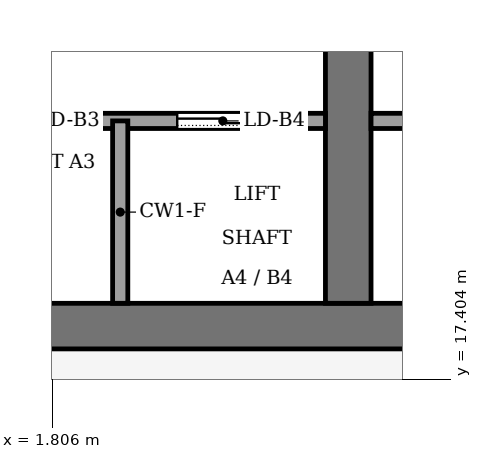
"""IFC4 building model, lengths in metres.
Left out: names, types, materials, properties, quantities, classifications, styles, units other than length and angle.
Written with IfcOpenShell. Run it as: python <this file> out.ifc"""

import sys

from ifc_helpers import new_model, si_unit, direction, frame, frame_2d, origin, place, context, subcontext, project, spatial, rectangle, extrude, element, fill, save


model = new_model("IFC4")
c1 = context("Model", 3, precision=1e-05, world=origin(), true_north=direction((0.0, 1.0)))
c2 = subcontext(c1, "Body", "Model", "MODEL_VIEW")
j1 = project(units=[si_unit("LENGTHUNIT", "METRE"), si_unit("PLANEANGLEUNIT", "RADIAN")], contexts=[c1])
p1 = place(None, origin())
s1 = spatial("IfcSite", under=j1, at=p1, CompositionType="ELEMENT")
p2 = place(p1, origin())
s2 = spatial("IfcBuilding", under=s1, at=p2, CompositionType="ELEMENT")
p3 = place(p2, frame((0.0, 0.0, 294.0)))
s3 = spatial("IfcBuildingStorey", under=s2, at=p3, CompositionType="ELEMENT", Elevation=294.0)
p4 = place(p3, frame((-13.2, 18.1, -0.13), z_axis=(0.0, 0.0, 1.0), x_axis=(1.0, 0.0, 0.0)))
e1 = element("IfcWall", 1, at=p4, inside=s3, PredefinedType="SHEAR", context=c2, shape_type="SweptSolid", body=[
    extrude(rectangle(XDim=26.4, YDim=0.6, at=frame_2d((13.2, 0.0))), origin(), (0.0, 0.0, 1.0), 4.0),
])
p5 = place(p3, frame((5.7, 18.4, -0.13), z_axis=(0.0, 0.0, 1.0), x_axis=(0.0, 1.0, 0.0)))
e2 = element("IfcWall", 2, at=p5, inside=s3, PredefinedType="SHEAR", context=c2, shape_type="SweptSolid", body=[
    extrude(rectangle(XDim=19.2, YDim=0.6, at=frame_2d((9.6, 0.0))), origin(), (0.0, 0.0, 1.0), 4.0),
])
p6 = place(p5, frame((13.3, 0.0, 0.13)))
e3 = element("IfcOpeningElement", 3, at=p6, cuts=e2, PredefinedType="OPENING", context=c2, shape_type="SweptSolid", body=[
    extrude(rectangle(XDim=2.4, YDim=2.4, at=frame_2d((1.2, 1.2))), frame((0.0, 0.31, 0.0), z_axis=(0.0, -1.0, 0.0), x_axis=(1.0, 0.0, 0.0)), (0.0, 0.0, 1.0), 0.62),
])
p7 = place(p3, frame((-5.4, 20.8, 0.0), z_axis=(0.0, 0.0, 1.0), x_axis=(1.0, 0.0, 0.0)))
e4 = element("IfcWall", 4, at=p7, inside=s3, PredefinedType="PARTITIONING", context=c2, shape_type="SweptSolid", body=[
    extrude(rectangle(XDim=10.8, YDim=0.2, at=frame_2d((5.4, 0.0))), origin(), (0.0, 0.0, 1.0), 3.87),
])
p8 = place(p7, frame((0.75, 0.0, 0.0)))
e5 = element("IfcOpeningElement", 5, at=p8, cuts=e4, PredefinedType="OPENING", context=c2, shape_type="SweptSolid", body=[
    extrude(rectangle(XDim=1.2, YDim=2.2, at=frame_2d((0.6, 1.1))), frame((0.0, 0.11, 0.0), z_axis=(0.0, -1.0, 0.0), x_axis=(1.0, 0.0, 0.0)), (0.0, 0.0, 1.0), 0.22),
])
p9 = place(p7, frame((3.45, 0.0, 0.0)))
e6 = element("IfcOpeningElement", 6, at=p9, cuts=e4, PredefinedType="OPENING", context=c2, shape_type="SweptSolid", body=[
    extrude(rectangle(XDim=1.2, YDim=2.2, at=frame_2d((0.6, 1.1))), frame((0.0, 0.11, 0.0), z_axis=(0.0, -1.0, 0.0), x_axis=(1.0, 0.0, 0.0)), (0.0, 0.0, 1.0), 0.22),
])
p10 = place(p7, frame((6.15, 0.0, 0.0)))
e7 = element("IfcOpeningElement", 7, at=p10, cuts=e4, PredefinedType="OPENING", context=c2, shape_type="SweptSolid", body=[
    extrude(rectangle(XDim=1.2, YDim=2.2, at=frame_2d((0.6, 1.1))), frame((0.0, 0.11, 0.0), z_axis=(0.0, -1.0, 0.0), x_axis=(1.0, 0.0, 0.0)), (0.0, 0.0, 1.0), 0.22),
])
p11 = place(p7, frame((8.85, 0.0, 0.0)))
e8 = element("IfcOpeningElement", 8, at=p11, cuts=e4, PredefinedType="OPENING", context=c2, shape_type="SweptSolid", body=[
    extrude(rectangle(XDim=1.2, YDim=2.2, at=frame_2d((0.6, 1.1))), frame((0.0, 0.11, 0.0), z_axis=(0.0, -1.0, 0.0), x_axis=(1.0, 0.0, 0.0)), (0.0, 0.0, 1.0), 0.22),
])
p12 = place(p3, frame((6.0, 20.8, 0.0), z_axis=(0.0, 0.0, 1.0), x_axis=(1.0, 0.0, 0.0)))
e9 = element("IfcWall", 9, at=p12, inside=s3, PredefinedType="PARTITIONING", context=c2, shape_type="SweptSolid", body=[
    extrude(rectangle(XDim=6.6, YDim=0.2, at=frame_2d((3.3, 0.0))), origin(), (0.0, 0.0, 1.0), 3.87),
])
p13 = place(p12, frame((1.15, 0.0, 0.0)))
e10 = element("IfcOpeningElement", 10, at=p13, cuts=e9, PredefinedType="OPENING", context=c2, shape_type="SweptSolid", body=[
    extrude(rectangle(XDim=1.0, YDim=2.1, at=frame_2d((0.5, 1.05))), frame((0.0, 0.11, 0.0), z_axis=(0.0, -1.0, 0.0), x_axis=(1.0, 0.0, 0.0)), (0.0, 0.0, 1.0), 0.22),
])
p14 = place(p12, frame((4.45, 0.0, 0.0)))
e11 = element("IfcOpeningElement", 11, at=p14, cuts=e9, PredefinedType="OPENING", context=c2, shape_type="SweptSolid", body=[
    extrude(rectangle(XDim=1.0, YDim=2.1, at=frame_2d((0.5, 1.05))), frame((0.0, 0.11, 0.0), z_axis=(0.0, -1.0, 0.0), x_axis=(1.0, 0.0, 0.0)), (0.0, 0.0, 1.0), 0.22),
])
p15 = place(p3, frame((2.7, 18.4, 0.0), z_axis=(0.0, 0.0, 1.0), x_axis=(0.0, 1.0, 0.0)))
e12 = element("IfcWall", 12, at=p15, inside=s3, PredefinedType="PARTITIONING", context=c2, shape_type="SweptSolid", body=[
    extrude(rectangle(XDim=2.4, YDim=0.2, at=frame_2d((1.2, 0.0))), origin(), (0.0, 0.0, 1.0), 3.87),
])
p16 = place(p10, origin())
e13 = element("IfcDoor", 13, at=p16, inside=s3, OperationType="SLIDING_TO_LEFT", PredefinedType="DOOR", context=c2, shape_type="SweptSolid", body=[
    extrude(rectangle(XDim=1.2, YDim=2.2, at=frame_2d((0.6, 1.1))), frame((0.0, 0.025, 0.0), z_axis=(0.0, -1.0, 0.0), x_axis=(1.0, 0.0, 0.0)), (0.0, 0.0, 1.0), 0.05),
])
fill(e7, e13)
p17 = place(p11, origin())
e14 = element("IfcDoor", 14, at=p17, inside=s3, OperationType="SLIDING_TO_LEFT", PredefinedType="DOOR", context=c2, shape_type="SweptSolid", body=[
    extrude(rectangle(XDim=1.2, YDim=2.2, at=frame_2d((0.6, 1.1))), frame((0.0, 0.025, 0.0), z_axis=(0.0, -1.0, 0.0), x_axis=(1.0, 0.0, 0.0)), (0.0, 0.0, 1.0), 0.05),
])
fill(e8, e14)
save(model, sys.argv[1])
